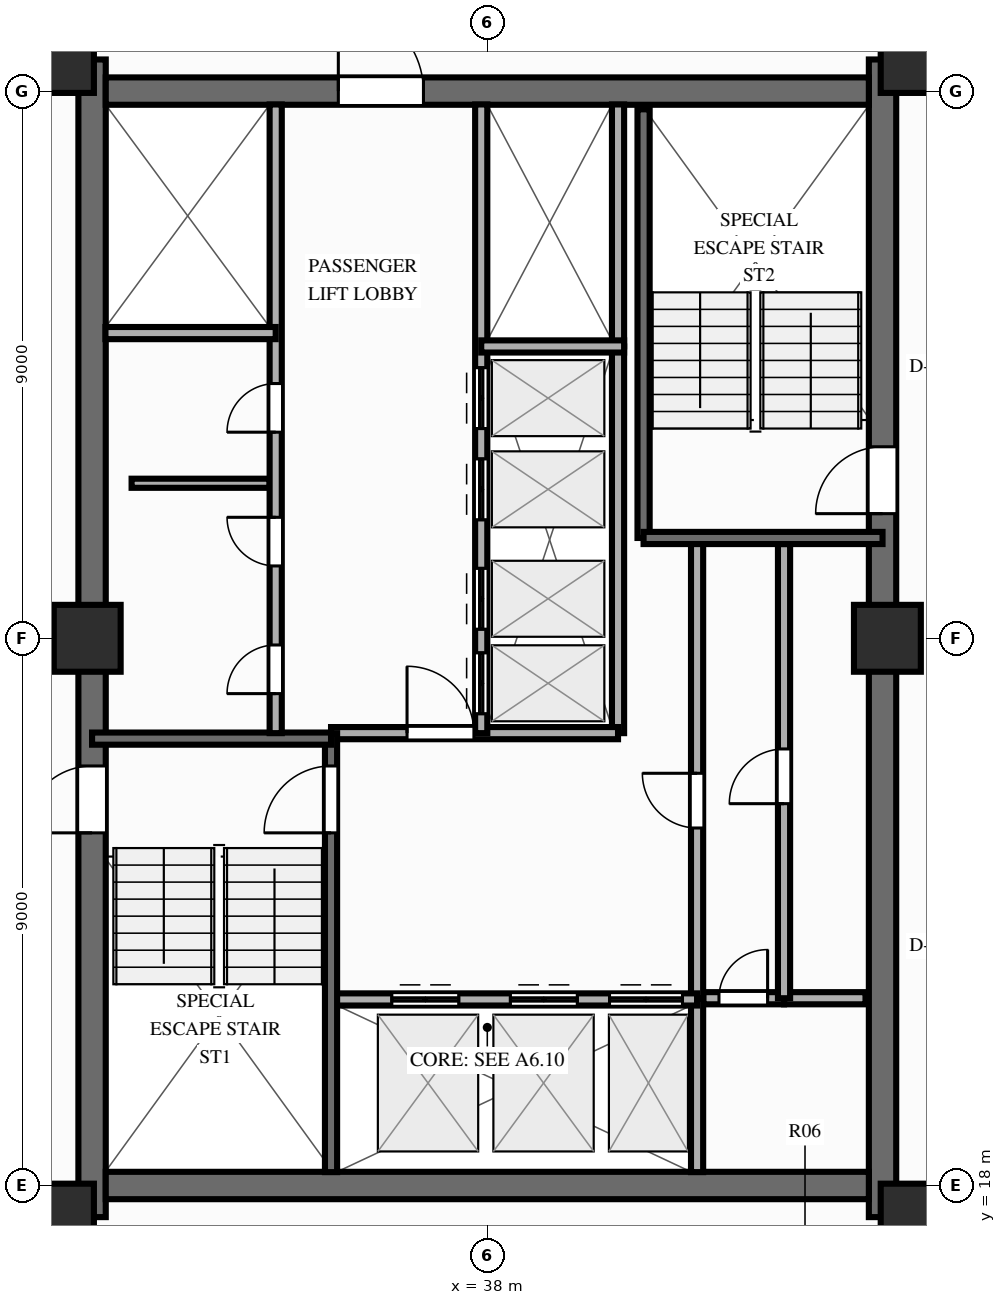
"""IFC4 building model, lengths in metres.
Left out: names, types, materials, properties, quantities, classifications, styles, units other than length and angle.
Written with IfcOpenShell. Run it as: python <this file> out.ifc"""

import sys

from ifc_helpers import new_model, si_unit, direction, frame, frame_2d, origin, origin_2d, place, context, subcontext, project, spatial, rectangle, extrude, source, transform, mapped, element, fill, save


model = new_model("IFC4")
c1 = context("Model", 3, precision=1e-05, world=origin(), true_north=direction((0.0, 1.0)))
c2 = subcontext(c1, "Body", "Model", "MODEL_VIEW")
j1 = project(units=[si_unit("LENGTHUNIT", "METRE"), si_unit("PLANEANGLEUNIT", "RADIAN")], contexts=[c1])
p1 = place(None, origin())
s1 = spatial("IfcSite", under=j1, at=p1, CompositionType="ELEMENT")
p2 = place(p1, origin())
s2 = spatial("IfcBuilding", under=s1, at=p2, CompositionType="ELEMENT")
p3 = place(p2, frame((0.0, 0.0, 156.1)))
s3 = spatial("IfcBuildingStorey", under=s2, at=p3, CompositionType="ELEMENT", Elevation=156.1)
p4 = place(p3, frame((31.5, 17.48, 0.0), z_axis=(0.0, 0.0, 1.0), x_axis=(0.0, 1.0, 0.0)))
e1 = element("IfcWall", 1, at=p4, inside=s3, PredefinedType="SHEAR", context=c2, shape_type="SweptSolid", body=[
    extrude(rectangle(XDim=19.04, YDim=0.45, at=frame_2d((9.52, 0.0))), origin(), (0.0, 0.0, 1.0), 3.0),
])
p5 = place(p4, frame((6.32, 0.0, 0.0)))
e2 = element("IfcOpeningElement", 2, at=p5, cuts=e1, PredefinedType="OPENING", context=c2, shape_type="SweptSolid", body=[
    extrude(rectangle(XDim=1.1, YDim=2.15, at=frame_2d((0.55, 1.075))), frame((0.0, 0.237, 0.0), z_axis=(0.0, -1.0, 0.0), x_axis=(1.0, 0.0, 0.0)), (0.0, 0.0, 1.0), 0.474),
])
p6 = place(p3, frame((44.5, 17.48, 0.0), z_axis=(0.0, 0.0, 1.0), x_axis=(0.0, 1.0, 0.0)))
e3 = element("IfcWall", 3, at=p6, inside=s3, PredefinedType="SHEAR", context=c2, shape_type="SweptSolid", body=[
    extrude(rectangle(XDim=19.04, YDim=0.45, at=frame_2d((9.52, 0.0))), origin(), (0.0, 0.0, 1.0), 3.0),
])
p7 = place(p6, frame((12.67, 0.0, 0.0), z_axis=(0.0, 0.0, 1.0), x_axis=(-1.0, 0.0, 0.0)))
e4 = element("IfcOpeningElement", 4, at=p7, cuts=e3, PredefinedType="OPENING", context=c2, shape_type="SweptSolid", body=[
    extrude(rectangle(XDim=1.1, YDim=2.15, at=frame_2d((0.55, 1.075))), frame((0.0, 0.237, 0.0), z_axis=(0.0, -1.0, 0.0), x_axis=(1.0, 0.0, 0.0)), (0.0, 0.0, 1.0), 0.474),
])
p8 = place(p3, frame((31.725, 18.0, 0.0), z_axis=(0.0, 0.0, 1.0), x_axis=(1.0, 0.0, 0.0)))
e5 = element("IfcWall", 5, at=p8, inside=s3, PredefinedType="SHEAR", context=c2, shape_type="SweptSolid", body=[
    extrude(rectangle(XDim=12.55, YDim=0.45, at=frame_2d((6.275, 0.0))), origin(), (0.0, 0.0, 1.0), 3.0),
])
p9 = place(p3, frame((31.725, 36.0, 0.0), z_axis=(0.0, 0.0, 1.0), x_axis=(1.0, 0.0, 0.0)))
e6 = element("IfcWall", 6, at=p9, inside=s3, PredefinedType="SHEAR", context=c2, shape_type="SweptSolid", body=[
    extrude(rectangle(XDim=12.55, YDim=0.45, at=frame_2d((6.275, 0.0))), origin(), (0.0, 0.0, 1.0), 3.0),
])
p10 = place(p9, frame((5.225, 0.0, 0.0), z_axis=(0.0, 0.0, 1.0), x_axis=(-1.0, 0.0, 0.0)))
e7 = element("IfcOpeningElement", 7, at=p10, cuts=e6, PredefinedType="OPENING", context=c2, shape_type="SweptSolid", body=[
    extrude(rectangle(XDim=1.4, YDim=2.15, at=frame_2d((0.7, 1.075))), frame((0.0, 0.237, 0.0), z_axis=(0.0, -1.0, 0.0), x_axis=(1.0, 0.0, 0.0)), (0.0, 0.0, 1.0), 0.474),
])
m1 = source(origin(), c2, "Body", "SweptSolid", [
    extrude(rectangle(XDim=1.1, YDim=1.1, at=origin_2d()), origin(), (0.0, 0.0, 1.0), 3.0),
])
for number, where, z_axis, x_axis in (
    (8, (30.98, 17.48, 0.0), (0.0, 0.0, 1.0), (1.0, 0.0, 0.0)),
    (9, (45.02, 17.48, 0.0), (0.0, 0.0, 1.0), (1.0, 0.0, 0.0)),
    (10, (30.98, 36.52, 0.0), (0.0, 0.0, 1.0), (1.0, 0.0, 0.0)),
    (11, (45.02, 36.52, 0.0), (0.0, 0.0, 1.0), (1.0, 0.0, 0.0)),
    (12, (31.42, 27.0, 0.0), (0.0, 0.0, 1.0), (1.0, 0.0, 0.0)),
    (13, (44.58, 27.0, 0.0), (0.0, 0.0, 1.0), (1.0, 0.0, 0.0)),
):
    element("IfcColumn", number, at=place(p3, frame(where, z_axis=z_axis, x_axis=x_axis)), inside=s3, PredefinedType="COLUMN", context=c2, shape_type="MappedRepresentation", body=[
        mapped(m1, transform((0.0, 0.0, 0.0), scale=1.0)),
    ])
p11 = place(p3, frame((32.15, 29.55, 0.0), z_axis=(0.0, 0.0, 1.0), x_axis=(1.0, 0.0, 0.0)))
e14 = element("IfcWall", 14, at=p11, inside=s3, PredefinedType="PARTITIONING", context=c2, shape_type="SweptSolid", body=[
    extrude(rectangle(XDim=2.27, YDim=0.15, at=frame_2d((1.135, 0.0))), origin(), (0.0, 0.0, 1.0), 2.79),
])
p12 = place(p3, frame((41.55, 21.08, 0.0), z_axis=(0.0, 0.0, 1.0), x_axis=(1.0, 0.0, 0.0)))
e15 = element("IfcWall", 15, at=p12, inside=s3, PredefinedType="PARTITIONING", context=c2, shape_type="SweptSolid", body=[
    extrude(rectangle(XDim=1.33, YDim=0.2, at=frame_2d((0.665, 0.0))), origin(), (0.0, 0.0, 1.0), 2.79),
])
p13 = place(p12, frame((0.26, 0.0, 0.0)))
e16 = element("IfcOpeningElement", 16, at=p13, cuts=e15, PredefinedType="OPENING", context=c2, shape_type="SweptSolid", body=[
    extrude(rectangle(XDim=0.8, YDim=2.05, at=frame_2d((0.4, 1.025))), frame((0.0, 0.112, 0.0), z_axis=(0.0, -1.0, 0.0), x_axis=(1.0, 0.0, 0.0)), (0.0, 0.0, 1.0), 0.224),
])
p14 = place(p3, frame((42.88, 21.08, 0.0), z_axis=(0.0, 0.0, 1.0), x_axis=(1.0, 0.0, 0.0)))
e17 = element("IfcWall", 17, at=p14, inside=s3, PredefinedType="PARTITIONING", context=c2, shape_type="SweptSolid", body=[
    extrude(rectangle(XDim=1.34, YDim=0.2, at=frame_2d((0.67, 0.0))), origin(), (0.0, 0.0, 1.0), 2.79),
])
p15 = place(p3, frame((42.88, 21.08, 0.0), z_axis=(0.0, 0.0, 1.0), x_axis=(0.0, 1.0, 0.0)))
e18 = element("IfcWall", 18, at=p15, inside=s3, PredefinedType="PARTITIONING", context=c2, shape_type="SweptSolid", body=[
    extrude(rectangle(XDim=7.47, YDim=0.2, at=frame_2d((3.735, 0.0))), origin(), (0.0, 0.0, 1.0), 2.79),
])
p16 = place(p15, frame((3.2, 0.0, 0.0)))
e19 = element("IfcOpeningElement", 19, at=p16, cuts=e18, PredefinedType="OPENING", context=c2, shape_type="SweptSolid", body=[
    extrude(rectangle(XDim=0.9, YDim=2.1, at=frame_2d((0.45, 1.05))), frame((0.0, 0.112, 0.0), z_axis=(0.0, -1.0, 0.0), x_axis=(1.0, 0.0, 0.0)), (0.0, 0.0, 1.0), 0.224),
])
p17 = place(p3, frame((41.45, 18.22, 0.0), z_axis=(0.0, 0.0, 1.0), x_axis=(0.0, 1.0, 0.0)))
e20 = element("IfcWall", 20, at=p17, inside=s3, PredefinedType="PARTITIONING", context=c2, shape_type="SweptSolid", body=[
    extrude(rectangle(XDim=2.86, YDim=0.2, at=frame_2d((1.43, 0.0))), origin(), (0.0, 0.0, 1.0), 2.79),
])
p18 = place(p3, frame((41.45, 21.08, 0.0), z_axis=(0.0, 0.0, 1.0), x_axis=(0.0, 1.0, 0.0)))
e21 = element("IfcWall", 21, at=p18, inside=s3, PredefinedType="PARTITIONING", context=c2, shape_type="SweptSolid", body=[
    extrude(rectangle(XDim=7.52, YDim=0.2, at=frame_2d((3.76, 0.0))), origin(), (0.0, 0.0, 1.0), 2.79),
])
p19 = place(p18, frame((2.8, 0.0, 0.0)))
e22 = element("IfcOpeningElement", 22, at=p19, cuts=e21, PredefinedType="OPENING", context=c2, shape_type="SweptSolid", body=[
    extrude(rectangle(XDim=0.9, YDim=2.1, at=frame_2d((0.45, 1.05))), frame((0.0, 0.112, 0.0), z_axis=(0.0, -1.0, 0.0), x_axis=(1.0, 0.0, 0.0)), (0.0, 0.0, 1.0), 0.224),
])
p20 = place(p3, frame((40.15, 25.44, 0.0), z_axis=(0.0, 0.0, 1.0), x_axis=(0.0, 1.0, 0.0)))
e23 = element("IfcWall", 23, at=p20, inside=s3, PredefinedType="PARTITIONING", context=c2, shape_type="SweptSolid", body=[
    extrude(rectangle(XDim=6.36, YDim=0.2, at=frame_2d((3.18, 0.0))), origin(), (0.0, 0.0, 1.0), 2.79),
])
p21 = place(p3, frame((40.15, 31.8, 0.0), z_axis=(0.0, 0.0, 1.0), x_axis=(0.0, 1.0, 0.0)))
e24 = element("IfcWall", 24, at=p21, inside=s3, PredefinedType="PARTITIONING", context=c2, shape_type="SweptSolid", body=[
    extrude(rectangle(XDim=3.98, YDim=0.2, at=frame_2d((1.99, 0.0))), origin(), (0.0, 0.0, 1.0), 2.79),
])
p22 = place(p3, frame((35.43, 21.06, 0.0), z_axis=(0.0, 0.0, 1.0), x_axis=(1.0, 0.0, 0.0)))
e25 = element("IfcWall", 25, at=p22, inside=s3, PredefinedType="PARTITIONING", context=c2, shape_type="SweptSolid", body=[
    extrude(rectangle(XDim=6.02, YDim=0.2, at=frame_2d((3.01, 0.0))), origin(), (0.0, 0.0, 1.0), 2.79),
])
p23 = place(p22, frame((1.0, 0.0, 0.0)))
e26 = element("IfcOpeningElement", 26, at=p23, cuts=e25, PredefinedType="OPENING", context=c2, shape_type="SweptSolid", body=[
    extrude(rectangle(XDim=1.1, YDim=2.15, at=frame_2d((0.55, 1.075))), frame((0.0, 0.112, 0.0), z_axis=(0.0, -1.0, 0.0), x_axis=(1.0, 0.0, 0.0)), (0.0, 0.0, 1.0), 0.224),
])
p24 = place(p22, frame((2.95, 0.0, 0.0)))
e27 = element("IfcOpeningElement", 27, at=p24, cuts=e25, PredefinedType="OPENING", context=c2, shape_type="SweptSolid", body=[
    extrude(rectangle(XDim=1.1, YDim=2.15, at=frame_2d((0.55, 1.075))), frame((0.0, 0.112, 0.0), z_axis=(0.0, -1.0, 0.0), x_axis=(1.0, 0.0, 0.0)), (0.0, 0.0, 1.0), 0.224),
])
p25 = place(p22, frame((4.58, 0.0, 0.0)))
e28 = element("IfcOpeningElement", 28, at=p25, cuts=e25, PredefinedType="OPENING", context=c2, shape_type="SweptSolid", body=[
    extrude(rectangle(XDim=1.2, YDim=2.15, at=frame_2d((0.6, 1.075))), frame((0.0, 0.112, 0.0), z_axis=(0.0, -1.0, 0.0), x_axis=(1.0, 0.0, 0.0)), (0.0, 0.0, 1.0), 0.224),
])
p26 = place(p3, frame((35.43, 25.44, 0.0), z_axis=(0.0, 0.0, 1.0), x_axis=(1.0, 0.0, 0.0)))
e29 = element("IfcWall", 29, at=p26, inside=s3, PredefinedType="PARTITIONING", context=c2, shape_type="SweptSolid", body=[
    extrude(rectangle(XDim=4.72, YDim=0.2, at=frame_2d((2.36, 0.0))), origin(), (0.0, 0.0, 1.0), 2.79),
])
p27 = place(p26, frame((1.25, 0.0, 0.0)))
e30 = element("IfcOpeningElement", 30, at=p27, cuts=e29, PredefinedType="OPENING", context=c2, shape_type="SweptSolid", body=[
    extrude(rectangle(XDim=1.1, YDim=2.15, at=frame_2d((0.55, 1.075))), frame((0.0, 0.112, 0.0), z_axis=(0.0, -1.0, 0.0), x_axis=(1.0, 0.0, 0.0)), (0.0, 0.0, 1.0), 0.224),
])
p28 = place(p3, frame((35.43, 18.22, 0.0), z_axis=(0.0, 0.0, 1.0), x_axis=(0.0, 1.0, 0.0)))
e31 = element("IfcWall", 31, at=p28, inside=s3, PredefinedType="SOLIDWALL", context=c2, shape_type="SweptSolid", body=[
    extrude(rectangle(XDim=7.22, YDim=0.2, at=frame_2d((3.61, 0.0))), origin(), (0.0, 0.0, 1.0), 2.79),
])
p29 = place(p28, frame((6.68, 0.0, 0.0), z_axis=(0.0, 0.0, 1.0), x_axis=(-1.0, 0.0, 0.0)))
e32 = element("IfcOpeningElement", 32, at=p29, cuts=e31, PredefinedType="OPENING", context=c2, shape_type="SweptSolid", body=[
    extrude(rectangle(XDim=1.1, YDim=2.15, at=frame_2d((0.55, 1.075))), frame((0.0, 0.112, 0.0), z_axis=(0.0, -1.0, 0.0), x_axis=(1.0, 0.0, 0.0)), (0.0, 0.0, 1.0), 0.224),
])
p30 = place(p3, frame((31.5, 25.35, 0.0), z_axis=(0.0, 0.0, 1.0), x_axis=(1.0, 0.0, 0.0)))
e33 = element("IfcWall", 33, at=p30, inside=s3, PredefinedType="SOLIDWALL", context=c2, shape_type="SweptSolid", body=[
    extrude(rectangle(XDim=3.93, YDim=0.2, at=frame_2d((1.965, 0.0))), origin(), (0.0, 0.0, 1.0), 2.79),
])
p31 = place(p3, frame((40.57, 28.65, 0.0), z_axis=(0.0, 0.0, 1.0), x_axis=(0.0, 1.0, 0.0)))
e34 = element("IfcWall", 34, at=p31, inside=s3, PredefinedType="SOLIDWALL", context=c2, shape_type="SweptSolid", body=[
    extrude(rectangle(XDim=7.05, YDim=0.2, at=frame_2d((3.525, 0.0))), origin(), (0.0, 0.0, 1.0), 2.79),
])
p32 = place(p3, frame((40.57, 28.65, 0.0), z_axis=(0.0, 0.0, 1.0), x_axis=(1.0, 0.0, 0.0)))
e35 = element("IfcWall", 35, at=p32, inside=s3, PredefinedType="SOLIDWALL", context=c2, shape_type="SweptSolid", body=[
    extrude(rectangle(XDim=3.93, YDim=0.2, at=frame_2d((1.965, 0.0))), origin(), (0.0, 0.0, 1.0), 2.79),
])
p33 = place(p3, frame((34.52, 25.44, 0.0), z_axis=(0.0, 0.0, 1.0), x_axis=(0.0, 1.0, 0.0)))
e36 = element("IfcWall", 36, at=p33, inside=s3, PredefinedType="PARTITIONING", context=c2, shape_type="SweptSolid", body=[
    extrude(rectangle(XDim=10.34, YDim=0.2, at=frame_2d((5.17, 0.0))), origin(), (0.0, 0.0, 1.0), 2.79),
])
p34 = place(p33, frame((0.65, 0.0, 0.0)))
e37 = element("IfcOpeningElement", 37, at=p34, cuts=e36, PredefinedType="OPENING", context=c2, shape_type="SweptSolid", body=[
    extrude(rectangle(XDim=0.8, YDim=2.05, at=frame_2d((0.4, 1.025))), frame((0.0, 0.112, 0.0), z_axis=(0.0, -1.0, 0.0), x_axis=(1.0, 0.0, 0.0)), (0.0, 0.0, 1.0), 0.224),
])
p35 = place(p33, frame((2.75, 0.0, 0.0)))
e38 = element("IfcOpeningElement", 38, at=p35, cuts=e36, PredefinedType="OPENING", context=c2, shape_type="SweptSolid", body=[
    extrude(rectangle(XDim=0.8, YDim=2.05, at=frame_2d((0.4, 1.025))), frame((0.0, 0.112, 0.0), z_axis=(0.0, -1.0, 0.0), x_axis=(1.0, 0.0, 0.0)), (0.0, 0.0, 1.0), 0.224),
])
p36 = place(p33, frame((4.95, 0.0, 0.0)))
e39 = element("IfcOpeningElement", 39, at=p36, cuts=e36, PredefinedType="OPENING", context=c2, shape_type="SweptSolid", body=[
    extrude(rectangle(XDim=0.8, YDim=2.05, at=frame_2d((0.4, 1.025))), frame((0.0, 0.112, 0.0), z_axis=(0.0, -1.0, 0.0), x_axis=(1.0, 0.0, 0.0)), (0.0, 0.0, 1.0), 0.224),
])
p37 = place(p3, frame((31.72, 32.02, 0.0), z_axis=(0.0, 0.0, 1.0), x_axis=(1.0, 0.0, 0.0)))
e40 = element("IfcWall", 40, at=p37, inside=s3, PredefinedType="PARTITIONING", context=c2, shape_type="SweptSolid", body=[
    extrude(rectangle(XDim=2.8, YDim=0.2, at=frame_2d((1.4, 0.0))), origin(), (0.0, 0.0, 1.0), 2.79),
])
p38 = place(p3, frame((37.9, 25.44, 0.0), z_axis=(0.0, 0.0, 1.0), x_axis=(0.0, 1.0, 0.0)))
e41 = element("IfcWall", 41, at=p38, inside=s3, PredefinedType="PARTITIONING", context=c2, shape_type="SweptSolid", body=[
    extrude(rectangle(XDim=10.34, YDim=0.2, at=frame_2d((5.17, 0.0))), origin(), (0.0, 0.0, 1.0), 2.79),
])
p39 = place(p38, frame((0.32, 0.0, 0.0)))
e42 = element("IfcOpeningElement", 42, at=p39, cuts=e41, PredefinedType="OPENING", context=c2, shape_type="SweptSolid", body=[
    extrude(rectangle(XDim=1.0, YDim=2.15, at=frame_2d((0.5, 1.075))), frame((0.0, 0.112, 0.0), z_axis=(0.0, -1.0, 0.0), x_axis=(1.0, 0.0, 0.0)), (0.0, 0.0, 1.0), 0.224),
])
p40 = place(p38, frame((1.71, 0.0, 0.0)))
e43 = element("IfcOpeningElement", 43, at=p40, cuts=e41, PredefinedType="OPENING", context=c2, shape_type="SweptSolid", body=[
    extrude(rectangle(XDim=1.0, YDim=2.15, at=frame_2d((0.5, 1.075))), frame((0.0, 0.112, 0.0), z_axis=(0.0, -1.0, 0.0), x_axis=(1.0, 0.0, 0.0)), (0.0, 0.0, 1.0), 0.224),
])
p41 = place(p38, frame((3.51, 0.0, 0.0)))
e44 = element("IfcOpeningElement", 44, at=p41, cuts=e41, PredefinedType="OPENING", context=c2, shape_type="SweptSolid", body=[
    extrude(rectangle(XDim=1.0, YDim=2.15, at=frame_2d((0.5, 1.075))), frame((0.0, 0.112, 0.0), z_axis=(0.0, -1.0, 0.0), x_axis=(1.0, 0.0, 0.0)), (0.0, 0.0, 1.0), 0.224),
])
p42 = place(p38, frame((5.01, 0.0, 0.0)))
e45 = element("IfcOpeningElement", 45, at=p42, cuts=e41, PredefinedType="OPENING", context=c2, shape_type="SweptSolid", body=[
    extrude(rectangle(XDim=1.0, YDim=2.15, at=frame_2d((0.5, 1.075))), frame((0.0, 0.112, 0.0), z_axis=(0.0, -1.0, 0.0), x_axis=(1.0, 0.0, 0.0)), (0.0, 0.0, 1.0), 0.224),
])
p43 = place(p3, frame((37.9, 31.8, 0.0), z_axis=(0.0, 0.0, 1.0), x_axis=(1.0, 0.0, 0.0)))
e46 = element("IfcWall", 46, at=p43, inside=s3, PredefinedType="PARTITIONING", context=c2, shape_type="SweptSolid", body=[
    extrude(rectangle(XDim=2.35, YDim=0.2, at=frame_2d((1.175, 0.0))), origin(), (0.0, 0.0, 1.0), 2.79),
])
m2 = source(origin(), c2, "Body", "SweptSolid", [
    extrude(rectangle(XDim=1.1, YDim=2.15, at=frame_2d((0.55, 1.075))), frame((0.0, 0.025, 0.0), z_axis=(0.0, -1.0, 0.0), x_axis=(1.0, 0.0, 0.0)), (0.0, 0.0, 1.0), 0.05),
])
p44 = place(p5, origin())
e47 = element("IfcDoor", 47, at=p44, inside=s3, OperationType="SINGLE_SWING_LEFT", PredefinedType="DOOR", context=c2, shape_type="MappedRepresentation", body=[
    mapped(m2, transform((0.0, 0.0, 0.0), scale=1.0)),
])
fill(e2, e47)
p45 = place(p7, origin())
e48 = element("IfcDoor", 48, at=p45, inside=s3, OperationType="SINGLE_SWING_RIGHT", PredefinedType="DOOR", context=c2, shape_type="MappedRepresentation", body=[
    mapped(m2, transform((0.0, 0.0, 0.0), scale=1.0)),
])
fill(e4, e48)
m3 = source(origin(), c2, "Body", "SweptSolid", [
    extrude(rectangle(XDim=1.4, YDim=2.15, at=frame_2d((0.7, 1.075))), frame((0.0, 0.025, 0.0), z_axis=(0.0, -1.0, 0.0), x_axis=(1.0, 0.0, 0.0)), (0.0, 0.0, 1.0), 0.05),
])
p46 = place(p10, origin())
e49 = element("IfcDoor", 49, at=p46, inside=s3, OperationType="SINGLE_SWING_RIGHT", PredefinedType="DOOR", context=c2, shape_type="MappedRepresentation", body=[
    mapped(m3, transform((0.0, 0.0, 0.0), scale=1.0)),
])
fill(e7, e49)
m4 = source(origin(), c2, "Body", "SweptSolid", [
    extrude(rectangle(XDim=0.8, YDim=2.05, at=frame_2d((0.4, 1.025))), frame((0.0, 0.025, 0.0), z_axis=(0.0, -1.0, 0.0), x_axis=(1.0, 0.0, 0.0)), (0.0, 0.0, 1.0), 0.05),
])
p47 = place(p13, origin())
e50 = element("IfcDoor", 50, at=p47, inside=s3, OperationType="SINGLE_SWING_RIGHT", PredefinedType="DOOR", context=c2, shape_type="MappedRepresentation", body=[
    mapped(m4, transform((0.0, 0.0, 0.0), scale=1.0)),
])
fill(e16, e50)
m5 = source(origin(), c2, "Body", "SweptSolid", [
    extrude(rectangle(XDim=0.9, YDim=2.1, at=frame_2d((0.45, 1.05))), frame((0.0, 0.025, 0.0), z_axis=(0.0, -1.0, 0.0), x_axis=(1.0, 0.0, 0.0)), (0.0, 0.0, 1.0), 0.05),
])
p48 = place(p16, origin())
e51 = element("IfcDoor", 51, at=p48, inside=s3, OperationType="SINGLE_SWING_LEFT", PredefinedType="DOOR", context=c2, shape_type="MappedRepresentation", body=[
    mapped(m5, transform((0.0, 0.0, 0.0), scale=1.0)),
])
fill(e19, e51)
p49 = place(p19, origin())
e52 = element("IfcDoor", 52, at=p49, inside=s3, OperationType="SINGLE_SWING_RIGHT", PredefinedType="DOOR", context=c2, shape_type="MappedRepresentation", body=[
    mapped(m5, transform((0.0, 0.0, 0.0), scale=1.0)),
])
fill(e22, e52)
p50 = place(p23, origin())
e53 = element("IfcDoor", 53, at=p50, inside=s3, OperationType="DOUBLE_DOOR_SLIDING", PredefinedType="DOOR", context=c2, shape_type="MappedRepresentation", body=[
    mapped(m2, transform((0.0, 0.0, 0.0), scale=1.0)),
])
fill(e26, e53)
p51 = place(p24, origin())
e54 = element("IfcDoor", 54, at=p51, inside=s3, OperationType="DOUBLE_DOOR_SLIDING", PredefinedType="DOOR", context=c2, shape_type="MappedRepresentation", body=[
    mapped(m2, transform((0.0, 0.0, 0.0), scale=1.0)),
])
fill(e27, e54)
m6 = source(origin(), c2, "Body", "SweptSolid", [
    extrude(rectangle(XDim=1.2, YDim=2.15, at=frame_2d((0.6, 1.075))), frame((0.0, 0.025, 0.0), z_axis=(0.0, -1.0, 0.0), x_axis=(1.0, 0.0, 0.0)), (0.0, 0.0, 1.0), 0.05),
])
p52 = place(p25, origin())
e55 = element("IfcDoor", 55, at=p52, inside=s3, OperationType="DOUBLE_DOOR_SLIDING", PredefinedType="DOOR", context=c2, shape_type="MappedRepresentation", body=[
    mapped(m6, transform((0.0, 0.0, 0.0), scale=1.0)),
])
fill(e28, e55)
p53 = place(p27, origin())
e56 = element("IfcDoor", 56, at=p53, inside=s3, OperationType="SINGLE_SWING_LEFT", PredefinedType="DOOR", context=c2, shape_type="MappedRepresentation", body=[
    mapped(m2, transform((0.0, 0.0, 0.0), scale=1.0)),
])
fill(e30, e56)
p54 = place(p29, origin())
e57 = element("IfcDoor", 57, at=p54, inside=s3, OperationType="SINGLE_SWING_RIGHT", PredefinedType="DOOR", context=c2, shape_type="MappedRepresentation", body=[
    mapped(m2, transform((0.0, 0.0, 0.0), scale=1.0)),
])
fill(e32, e57)
p55 = place(p34, origin())
e58 = element("IfcDoor", 58, at=p55, inside=s3, OperationType="SINGLE_SWING_LEFT", PredefinedType="DOOR", context=c2, shape_type="MappedRepresentation", body=[
    mapped(m4, transform((0.0, 0.0, 0.0), scale=1.0)),
])
fill(e37, e58)
p56 = place(p35, origin())
e59 = element("IfcDoor", 59, at=p56, inside=s3, OperationType="SINGLE_SWING_RIGHT", PredefinedType="DOOR", context=c2, shape_type="MappedRepresentation", body=[
    mapped(m4, transform((0.0, 0.0, 0.0), scale=1.0)),
])
fill(e38, e59)
p57 = place(p36, origin())
e60 = element("IfcDoor", 60, at=p57, inside=s3, OperationType="SINGLE_SWING_LEFT", PredefinedType="DOOR", context=c2, shape_type="MappedRepresentation", body=[
    mapped(m4, transform((0.0, 0.0, 0.0), scale=1.0)),
])
fill(e39, e60)
m7 = source(origin(), c2, "Body", "SweptSolid", [
    extrude(rectangle(XDim=1.0, YDim=2.15, at=frame_2d((0.5, 1.075))), frame((0.0, 0.025, 0.0), z_axis=(0.0, -1.0, 0.0), x_axis=(1.0, 0.0, 0.0)), (0.0, 0.0, 1.0), 0.05),
])
p58 = place(p39, origin())
e61 = element("IfcDoor", 61, at=p58, inside=s3, OperationType="DOUBLE_DOOR_SLIDING", PredefinedType="DOOR", context=c2, shape_type="MappedRepresentation", body=[
    mapped(m7, transform((0.0, 0.0, 0.0), scale=1.0)),
])
fill(e42, e61)
p59 = place(p40, origin())
e62 = element("IfcDoor", 62, at=p59, inside=s3, OperationType="DOUBLE_DOOR_SLIDING", PredefinedType="DOOR", context=c2, shape_type="MappedRepresentation", body=[
    mapped(m7, transform((0.0, 0.0, 0.0), scale=1.0)),
])
fill(e43, e62)
p60 = place(p41, origin())
e63 = element("IfcDoor", 63, at=p60, inside=s3, OperationType="DOUBLE_DOOR_SLIDING", PredefinedType="DOOR", context=c2, shape_type="MappedRepresentation", body=[
    mapped(m7, transform((0.0, 0.0, 0.0), scale=1.0)),
])
fill(e44, e63)
p61 = place(p42, origin())
e64 = element("IfcDoor", 64, at=p61, inside=s3, OperationType="DOUBLE_DOOR_SLIDING", PredefinedType="DOOR", context=c2, shape_type="MappedRepresentation", body=[
    mapped(m7, transform((0.0, 0.0, 0.0), scale=1.0)),
])
fill(e45, e64)
save(model, sys.argv[1])
